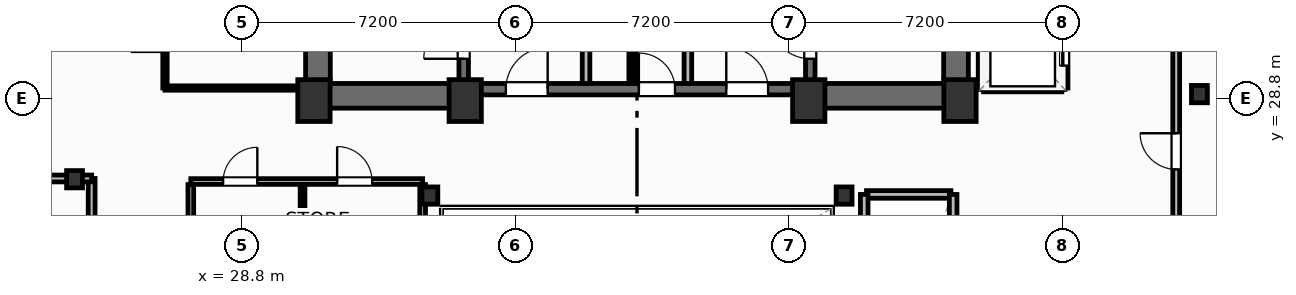
"""IFC4 building model, lengths in metres.
Left out: names, types, materials, properties, quantities, classifications, styles, units other than length and angle.
Written with IfcOpenShell. Run it as: python <this file> out.ifc"""

import sys

from ifc_helpers import new_model, si_unit, direction, frame, frame_2d, origin, origin_2d, place, context, subcontext, project, spatial, rectangle, i_section, extrude, element, fill, save


model = new_model("IFC4")
c1 = context("Model", 3, precision=1e-05, world=origin(), true_north=direction((0.0, 1.0)))
c2 = subcontext(c1, "Body", "Model", "MODEL_VIEW")
j1 = project(units=[si_unit("LENGTHUNIT", "METRE"), si_unit("PLANEANGLEUNIT", "RADIAN")], contexts=[c1])
p1 = place(None, origin())
s1 = spatial("IfcSite", under=j1, at=p1, CompositionType="ELEMENT")
p2 = place(p1, origin())
s2 = spatial("IfcBuilding", under=s1, at=p2, CompositionType="ELEMENT")
p3 = place(p2, frame((0.0, 0.0, 174.6)))
s3 = spatial("IfcBuildingStorey", under=s2, at=p3, CompositionType="ELEMENT", Elevation=174.6)
for number, where, z_axis, x_axis in (
    (1, (30.7, 28.75, 0.0), (0.0, 0.0, 1.0), (1.0, 0.0, 0.0)),
    (2, (34.68, 28.75, 0.0), (0.0, 0.0, 1.0), (1.0, 0.0, 0.0)),
    (3, (43.72, 28.75, 0.0), (0.0, 0.0, 1.0), (1.0, 0.0, 0.0)),
    (4, (47.7, 28.75, 0.0), (0.0, 0.0, 1.0), (1.0, 0.0, 0.0)),
):
    element("IfcColumn", number, at=place(p3, frame(where, z_axis=z_axis, x_axis=x_axis)), inside=s3, PredefinedType="COLUMN", context=c2, shape_type="SweptSolid", body=[
        extrude(rectangle(XDim=0.85, YDim=1.1, at=origin_2d()), origin(), (0.0, 0.0, 1.0), 3.7),
    ])
for number, where, z_axis, x_axis in (
    (5, (33.75, 26.25, 0.0), (0.0, 0.0, 1.0), (1.0, 0.0, 0.0)),
    (6, (44.65, 26.25, 0.0), (0.0, 0.0, 1.0), (1.0, 0.0, 0.0)),
    (7, (24.4, 26.68, 0.0), (0.0, 0.0, 1.0), (1.0, 0.0, 0.0)),
    (8, (54.0, 28.92, 0.0), (0.0, 0.0, 1.0), (1.0, 0.0, 0.0)),
):
    element("IfcColumn", number, at=place(p3, frame(where, z_axis=z_axis, x_axis=x_axis)), inside=s3, PredefinedType="COLUMN", context=c2, shape_type="SweptSolid", body=[
        extrude(i_section(OverallWidth=0.418, OverallDepth=0.455, WebThickness=0.042, FlangeThickness=0.068, FilletRadius=0.025, at=origin_2d()), origin(), (0.0, 0.0, 1.0), 3.7),
    ])
for number, where, z_axis, x_axis in (
    (9, (30.805, 29.2, 0.0), (0.0, 0.0, 1.0), (0.0, 1.0, 0.0)),
    (10, (47.595, 29.2, 0.0), (0.0, 0.0, 1.0), (0.0, 1.0, 0.0)),
):
    element("IfcWall", number, at=place(p3, frame(where, z_axis=z_axis, x_axis=x_axis)), inside=s3, PredefinedType="SHEAR", context=c2, shape_type="SweptSolid", body=[
        extrude(rectangle(XDim=9.22, YDim=0.65, at=frame_2d((4.61, 0.0))), origin(), (0.0, 0.0, 1.0), 3.45),
    ])
p4 = place(p3, frame((30.48, 28.875, 0.0), z_axis=(0.0, 0.0, 1.0), x_axis=(1.0, 0.0, 0.0)))
e11 = element("IfcWall", 11, at=p4, inside=s3, PredefinedType="SHEAR", context=c2, shape_type="SweptSolid", body=[
    extrude(rectangle(XDim=4.32, YDim=0.65, at=frame_2d((2.16, 0.0))), origin(), (0.0, 0.0, 1.0), 3.45),
])
p5 = place(p3, frame((43.6, 28.875, 0.0), z_axis=(0.0, 0.0, 1.0), x_axis=(1.0, 0.0, 0.0)))
e12 = element("IfcWall", 12, at=p5, inside=s3, PredefinedType="SHEAR", context=c2, shape_type="SweptSolid", body=[
    extrude(rectangle(XDim=4.32, YDim=0.65, at=frame_2d((2.16, 0.0))), origin(), (0.0, 0.0, 1.0), 3.45),
])
p6 = place(p3, frame((34.8, 29.05, 0.0), z_axis=(0.0, 0.0, 1.0), x_axis=(1.0, 0.0, 0.0)))
e13 = element("IfcWall", 13, at=p6, inside=s3, PredefinedType="SHEAR", context=c2, shape_type="SweptSolid", body=[
    extrude(rectangle(XDim=8.8, YDim=0.3, at=frame_2d((4.4, 0.0))), origin(), (0.0, 0.0, 1.0), 3.45),
])
p7 = place(p6, frame((0.95, 0.0, 0.0)))
e14 = element("IfcOpeningElement", 14, at=p7, cuts=e13, PredefinedType="OPENING", context=c2, shape_type="SweptSolid", body=[
    extrude(rectangle(XDim=1.1, YDim=2.15, at=frame_2d((0.55, 1.075))), frame((0.0, 0.16, 0.0), z_axis=(0.0, -1.0, 0.0), x_axis=(1.0, 0.0, 0.0)), (0.0, 0.0, 1.0), 0.32),
])
p8 = place(p6, frame((6.75, 0.0, 0.0)))
e15 = element("IfcOpeningElement", 15, at=p8, cuts=e13, PredefinedType="OPENING", context=c2, shape_type="SweptSolid", body=[
    extrude(rectangle(XDim=1.1, YDim=2.15, at=frame_2d((0.55, 1.075))), frame((0.0, 0.16, 0.0), z_axis=(0.0, -1.0, 0.0), x_axis=(1.0, 0.0, 0.0)), (0.0, 0.0, 1.0), 0.32),
])
p9 = place(p6, frame((4.45, 0.0, 0.0)))
e16 = element("IfcOpeningElement", 16, at=p9, cuts=e13, PredefinedType="OPENING", context=c2, shape_type="SweptSolid", body=[
    extrude(rectangle(XDim=0.95, YDim=2.15, at=frame_2d((0.475, 1.075))), frame((0.0, 0.16, 0.0), z_axis=(0.0, -1.0, 0.0), x_axis=(1.0, 0.0, 0.0)), (0.0, 0.0, 1.0), 0.32),
])
p10 = place(p3, frame((34.64, 29.2, 0.0), z_axis=(0.0, 0.0, 1.0), x_axis=(0.0, 1.0, 0.0)))
e17 = element("IfcWall", 17, at=p10, inside=s3, PredefinedType="SHEAR", context=c2, shape_type="SweptSolid", body=[
    extrude(rectangle(XDim=9.22, YDim=0.25, at=frame_2d((4.61, 0.0))), origin(), (0.0, 0.0, 1.0), 3.45),
])
p11 = place(p10, frame((0.65, 0.0, 0.0)))
e18 = element("IfcOpeningElement", 18, at=p11, cuts=e17, PredefinedType="OPENING", context=c2, shape_type="SweptSolid", body=[
    extrude(rectangle(XDim=1.05, YDim=2.15, at=frame_2d((0.525, 1.075))), frame((0.0, 0.135, 0.0), z_axis=(0.0, -1.0, 0.0), x_axis=(1.0, 0.0, 0.0)), (0.0, 0.0, 1.0), 0.27),
])
p12 = place(p3, frame((43.76, 29.2, 0.0), z_axis=(0.0, 0.0, 1.0), x_axis=(0.0, 1.0, 0.0)))
e19 = element("IfcWall", 19, at=p12, inside=s3, PredefinedType="SHEAR", context=c2, shape_type="SweptSolid", body=[
    extrude(rectangle(XDim=9.22, YDim=0.25, at=frame_2d((4.61, 0.0))), origin(), (0.0, 0.0, 1.0), 3.45),
])
p13 = place(p12, frame((0.65, 0.0, 0.0)))
e20 = element("IfcOpeningElement", 20, at=p13, cuts=e19, PredefinedType="OPENING", context=c2, shape_type="SweptSolid", body=[
    extrude(rectangle(XDim=1.05, YDim=2.15, at=frame_2d((0.525, 1.075))), frame((0.0, 0.135, 0.0), z_axis=(0.0, -1.0, 0.0), x_axis=(1.0, 0.0, 0.0)), (0.0, 0.0, 1.0), 0.27),
])
p14 = place(p3, frame((24.85, 19.2, 0.0), z_axis=(0.0, 0.0, 1.0), x_axis=(0.0, 1.0, 0.0)))
e21 = element("IfcWall", 21, at=p14, inside=s3, PredefinedType="PARTITIONING", context=c2, shape_type="SweptSolid", body=[
    extrude(rectangle(XDim=7.5, YDim=0.18, at=frame_2d((3.75, 0.0))), origin(), (0.0, 0.0, 1.0), 3.45),
])
p15 = place(p14, frame((3.275, 0.0, 0.0)))
e22 = element("IfcOpeningElement", 22, at=p15, cuts=e21, PredefinedType="OPENING", context=c2, shape_type="SweptSolid", body=[
    extrude(rectangle(XDim=0.95, YDim=2.05, at=frame_2d((0.475, 1.025))), frame((0.0, 0.1, 0.0), z_axis=(0.0, -1.0, 0.0), x_axis=(1.0, 0.0, 0.0)), (0.0, 0.0, 1.0), 0.2),
])
p16 = place(p3, frame((3.653, 26.7, 0.0), z_axis=(0.0, 0.0, 1.0), x_axis=(1.0, 0.0, 0.0)))
e23 = element("IfcWall", 23, at=p16, inside=s3, PredefinedType="PARTITIONING", context=c2, shape_type="SweptSolid", body=[
    extrude(rectangle(XDim=21.197, YDim=0.18, at=frame_2d((10.599, 0.0))), origin(), (0.0, 0.0, 1.0), 2.662),
])
p17 = place(p3, frame((53.39, 19.24, 0.0), z_axis=(0.0, 0.0, 1.0), x_axis=(0.0, 1.0, 0.0)))
e24 = element("IfcWall", 24, at=p17, inside=s3, PredefinedType="PARTITIONING", context=c2, shape_type="SweptSolid", body=[
    extrude(rectangle(XDim=20.06, YDim=0.18, at=frame_2d((10.03, 0.0))), origin(), (0.0, 0.0, 1.0), 3.45),
])
p18 = place(p17, frame((7.7, 0.0, 0.0)))
e25 = element("IfcOpeningElement", 25, at=p18, cuts=e24, PredefinedType="OPENING", context=c2, shape_type="SweptSolid", body=[
    extrude(rectangle(XDim=0.95, YDim=2.05, at=frame_2d((0.475, 1.025))), frame((0.0, 0.1, 0.0), z_axis=(0.0, -1.0, 0.0), x_axis=(1.0, 0.0, 0.0)), (0.0, 0.0, 1.0), 0.2),
])
for number, where, z_axis, x_axis in (
    (26, (37.86, 29.2, 0.0), (0.0, 0.0, 1.0), (0.0, 1.0, 0.0)),
    (27, (40.54, 29.2, 0.0), (0.0, 0.0, 1.0), (0.0, 1.0, 0.0)),
):
    element("IfcWall", number, at=place(p3, frame(where, z_axis=z_axis, x_axis=x_axis)), inside=s3, PredefinedType="PARTITIONING", context=c2, shape_type="SweptSolid", body=[
        extrude(rectangle(XDim=5.18, YDim=0.2, at=frame_2d((2.59, 0.0))), origin(), (0.0, 0.0, 1.0), 3.45),
    ])
p19 = place(p3, frame((39.05, 29.2, 0.0), z_axis=(0.0, 0.0, 1.0), x_axis=(0.0, 1.0, 0.0)))
e28 = element("IfcWall", 28, at=p19, inside=s3, PredefinedType="PARTITIONING", context=c2, shape_type="SweptSolid", body=[
    extrude(rectangle(XDim=5.22, YDim=0.125, at=frame_2d((2.61, 0.0))), origin(), (0.0, 0.0, 1.0), 3.45),
])
p20 = place(p19, frame((2.05, 0.0, 0.0)))
e29 = element("IfcOpeningElement", 29, at=p20, cuts=e28, PredefinedType="OPENING", context=c2, shape_type="SweptSolid", body=[
    extrude(rectangle(XDim=0.85, YDim=2.05, at=frame_2d((0.425, 1.025))), frame((0.0, 0.073, 0.0), z_axis=(0.0, -1.0, 0.0), x_axis=(1.0, 0.0, 0.0)), (0.0, 0.0, 1.0), 0.145),
])
p21 = place(p3, frame((27.46, 26.62, 0.0), z_axis=(0.0, 0.0, 1.0), x_axis=(1.0, 0.0, 0.0)))
e30 = element("IfcWall", 30, at=p21, inside=s3, PredefinedType="PARTITIONING", context=c2, shape_type="SweptSolid", body=[
    extrude(rectangle(XDim=6.1, YDim=0.15, at=frame_2d((3.05, 0.0))), origin(), (0.0, 0.0, 1.0), 2.662),
])
p22 = place(p21, frame((0.85, 0.0, 0.0)))
e31 = element("IfcOpeningElement", 31, at=p22, cuts=e30, PredefinedType="OPENING", context=c2, shape_type="SweptSolid", body=[
    extrude(rectangle(XDim=0.9, YDim=2.05, at=frame_2d((0.45, 1.025))), frame((0.0, 0.085, 0.0), z_axis=(0.0, -1.0, 0.0), x_axis=(1.0, 0.0, 0.0)), (0.0, 0.0, 1.0), 0.17),
])
p23 = place(p21, frame((3.85, 0.0, 0.0)))
e32 = element("IfcOpeningElement", 32, at=p23, cuts=e30, PredefinedType="OPENING", context=c2, shape_type="SweptSolid", body=[
    extrude(rectangle(XDim=0.92, YDim=2.05, at=frame_2d((0.46, 1.025))), frame((0.0, 0.085, 0.0), z_axis=(0.0, -1.0, 0.0), x_axis=(1.0, 0.0, 0.0)), (0.0, 0.0, 1.0), 0.17),
])
p24 = place(p3, frame((30.4, 23.0, 0.0), z_axis=(0.0, 0.0, 1.0), x_axis=(0.0, 1.0, 0.0)))
e33 = element("IfcWall", 33, at=p24, inside=s3, PredefinedType="PARTITIONING", context=c2, shape_type="SweptSolid", body=[
    extrude(rectangle(XDim=3.54, YDim=0.125, at=frame_2d((1.77, 0.0))), origin(), (0.0, 0.0, 1.0), 3.45),
])
p25 = place(p3, frame((27.46, 19.38, 0.0), z_axis=(0.0, 0.0, 1.0), x_axis=(0.0, 1.0, 0.0)))
e34 = element("IfcWall", 34, at=p25, inside=s3, PredefinedType="PARTITIONING", context=c2, shape_type="SweptSolid", body=[
    extrude(rectangle(XDim=7.16, YDim=0.15, at=frame_2d((3.58, 0.0))), origin(), (0.0, 0.0, 1.0), 3.45),
])
p26 = place(p25, frame((1.1, 0.0, 0.0)))
e35 = element("IfcOpeningElement", 35, at=p26, cuts=e34, PredefinedType="OPENING", context=c2, shape_type="SweptSolid", body=[
    extrude(rectangle(XDim=0.95, YDim=2.05, at=frame_2d((0.475, 1.025))), frame((0.0, 0.085, 0.0), z_axis=(0.0, -1.0, 0.0), x_axis=(1.0, 0.0, 0.0)), (0.0, 0.0, 1.0), 0.17),
])
p27 = place(p3, frame((33.56, 19.38, 0.0), z_axis=(0.0, 0.0, 1.0), x_axis=(0.0, 1.0, 0.0)))
e36 = element("IfcWall", 36, at=p27, inside=s3, PredefinedType="PARTITIONING", context=c2, shape_type="SweptSolid", body=[
    extrude(rectangle(XDim=7.16, YDim=0.15, at=frame_2d((3.58, 0.0))), origin(), (0.0, 0.0, 1.0), 2.824),
])
p28 = place(p3, frame((26.78, 29.08, 0.0), z_axis=(0.0, 0.0, 1.0), x_axis=(1.0, 0.0, 0.0)))
e37 = element("IfcWall", 37, at=p28, inside=s3, PredefinedType="PARTITIONING", context=c2, shape_type="SweptSolid", body=[
    extrude(rectangle(XDim=3.7, YDim=0.115, at=frame_2d((1.85, 0.0))), origin(), (0.0, 0.0, 1.0), 3.45),
])
p29 = place(p3, frame((26.78, 29.08, 0.0), z_axis=(0.0, 0.0, 1.0), x_axis=(0.0, 1.0, 0.0)))
e38 = element("IfcWall", 38, at=p29, inside=s3, PredefinedType="PARTITIONING", context=c2, shape_type="SweptSolid", body=[
    extrude(rectangle(XDim=3.11, YDim=0.115, at=frame_2d((1.555, 0.0))), origin(), (0.0, 0.0, 1.0), 3.45),
])
p30 = place(p29, frame((0.95, 0.0, 0.0)))
e39 = element("IfcOpeningElement", 39, at=p30, cuts=e38, PredefinedType="OPENING", context=c2, shape_type="SweptSolid", body=[
    extrude(rectangle(XDim=0.9, YDim=2.05, at=frame_2d((0.45, 1.025))), frame((0.0, 0.067, 0.0), z_axis=(0.0, -1.0, 0.0), x_axis=(1.0, 0.0, 0.0)), (0.0, 0.0, 1.0), 0.135),
])
p31 = place(p3, frame((48.32, 29.08, 0.0), z_axis=(0.0, 0.0, 1.0), x_axis=(1.0, 0.0, 0.0)))
e40 = element("IfcWall", 40, at=p31, inside=s3, PredefinedType="PARTITIONING", context=c2, shape_type="SweptSolid", body=[
    extrude(rectangle(XDim=2.06, YDim=0.2, at=frame_2d((1.03, 0.0))), origin(), (0.0, 0.0, 1.0), 2.662),
])
p32 = place(p3, frame((48.28, 29.08, 0.0), z_axis=(0.0, 0.0, 1.0), x_axis=(0.0, 1.0, 0.0)))
e41 = element("IfcWall", 41, at=p32, inside=s3, PredefinedType="PARTITIONING", context=c2, shape_type="SweptSolid", body=[
    extrude(rectangle(XDim=6.89, YDim=0.2, at=frame_2d((3.445, 0.0))), origin(), (0.0, 0.0, 1.0), 3.45),
])
p33 = place(p3, frame((50.44, 29.08, 0.0), z_axis=(0.0, 0.0, 1.0), x_axis=(0.0, 1.0, 0.0)))
e42 = element("IfcWall", 42, at=p33, inside=s3, PredefinedType="PARTITIONING", context=c2, shape_type="SweptSolid", body=[
    extrude(rectangle(XDim=6.89, YDim=0.2, at=frame_2d((3.445, 0.0))), origin(), (0.0, 0.0, 1.0), 3.45),
])
p34 = place(p33, frame((0.59, 0.0, 0.0)))
e43 = element("IfcOpeningElement", 43, at=p34, cuts=e42, PredefinedType="OPENING", context=c2, shape_type="SweptSolid", body=[
    extrude(rectangle(XDim=1.1, YDim=2.15, at=frame_2d((0.55, 1.075))), frame((0.0, 0.11, 0.0), z_axis=(0.0, -1.0, 0.0), x_axis=(1.0, 0.0, 0.0)), (0.0, 0.0, 1.0), 0.22),
])
p35 = place(p33, frame((2.89, 0.0, 0.0)))
e44 = element("IfcOpeningElement", 44, at=p35, cuts=e42, PredefinedType="OPENING", context=c2, shape_type="SweptSolid", body=[
    extrude(rectangle(XDim=1.1, YDim=2.15, at=frame_2d((0.55, 1.075))), frame((0.0, 0.11, 0.0), z_axis=(0.0, -1.0, 0.0), x_axis=(1.0, 0.0, 0.0)), (0.0, 0.0, 1.0), 0.22),
])
p36 = place(p33, frame((5.19, 0.0, 0.0)))
e45 = element("IfcOpeningElement", 45, at=p36, cuts=e42, PredefinedType="OPENING", context=c2, shape_type="SweptSolid", body=[
    extrude(rectangle(XDim=1.1, YDim=2.15, at=frame_2d((0.55, 1.075))), frame((0.0, 0.11, 0.0), z_axis=(0.0, -1.0, 0.0), x_axis=(1.0, 0.0, 0.0)), (0.0, 0.0, 1.0), 0.22),
])
p37 = place(p3, frame((45.24, 26.28, 0.0), z_axis=(0.0, 0.0, 1.0), x_axis=(1.0, 0.0, 0.0)))
e46 = element("IfcWall", 46, at=p37, inside=s3, PredefinedType="PARTITIONING", context=c2, shape_type="SweptSolid", body=[
    extrude(rectangle(XDim=2.22, YDim=0.2, at=frame_2d((1.11, 0.0))), origin(), (0.0, 0.0, 1.0), 3.45),
])
for number, where, z_axis, x_axis in (
    (47, (45.18, 19.38, 0.0), (0.0, 0.0, 1.0), (0.0, 1.0, 0.0)),
    (48, (47.52, 19.38, 0.0), (0.0, 0.0, 1.0), (0.0, 1.0, 0.0)),
):
    element("IfcWall", number, at=place(p3, frame(where, z_axis=z_axis, x_axis=x_axis)), inside=s3, PredefinedType="PARTITIONING", context=c2, shape_type="SweptSolid", body=[
        extrude(rectangle(XDim=6.9, YDim=0.2, at=frame_2d((3.45, 0.0))), origin(), (0.0, 0.0, 1.0), 3.45),
    ])
p38 = place(p18, origin())
e49 = element("IfcDoor", 49, at=p38, inside=s3, OperationType="SINGLE_SWING_RIGHT", PredefinedType="DOOR", context=c2, shape_type="SweptSolid", body=[
    extrude(rectangle(XDim=0.95, YDim=2.05, at=frame_2d((0.475, 1.025))), frame((0.0, 0.025, 0.0), z_axis=(0.0, -1.0, 0.0), x_axis=(1.0, 0.0, 0.0)), (0.0, 0.0, 1.0), 0.05),
])
fill(e25, e49)
p39 = place(p11, origin())
e50 = element("IfcDoor", 50, at=p39, inside=s3, OperationType="SINGLE_SWING_LEFT", PredefinedType="DOOR", context=c2, shape_type="SweptSolid", body=[
    extrude(rectangle(XDim=1.05, YDim=2.15, at=frame_2d((0.525, 1.075))), frame((0.0, 0.025, 0.0), z_axis=(0.0, -1.0, 0.0), x_axis=(1.0, 0.0, 0.0)), (0.0, 0.0, 1.0), 0.05),
])
fill(e18, e50)
p40 = place(p13, origin())
e51 = element("IfcDoor", 51, at=p40, inside=s3, OperationType="SINGLE_SWING_RIGHT", PredefinedType="DOOR", context=c2, shape_type="SweptSolid", body=[
    extrude(rectangle(XDim=1.05, YDim=2.15, at=frame_2d((0.525, 1.075))), frame((0.0, 0.025, 0.0), z_axis=(0.0, -1.0, 0.0), x_axis=(1.0, 0.0, 0.0)), (0.0, 0.0, 1.0), 0.05),
])
fill(e20, e51)
p41 = place(p7, origin())
e52 = element("IfcDoor", 52, at=p41, inside=s3, OperationType="SINGLE_SWING_RIGHT", PredefinedType="DOOR", context=c2, shape_type="SweptSolid", body=[
    extrude(rectangle(XDim=1.1, YDim=2.15, at=frame_2d((0.55, 1.075))), frame((0.0, 0.025, 0.0), z_axis=(0.0, -1.0, 0.0), x_axis=(1.0, 0.0, 0.0)), (0.0, 0.0, 1.0), 0.05),
])
fill(e14, e52)
p42 = place(p8, origin())
e53 = element("IfcDoor", 53, at=p42, inside=s3, OperationType="SINGLE_SWING_LEFT", PredefinedType="DOOR", context=c2, shape_type="SweptSolid", body=[
    extrude(rectangle(XDim=1.1, YDim=2.15, at=frame_2d((0.55, 1.075))), frame((0.0, 0.025, 0.0), z_axis=(0.0, -1.0, 0.0), x_axis=(1.0, 0.0, 0.0)), (0.0, 0.0, 1.0), 0.05),
])
fill(e15, e53)
p43 = place(p9, origin())
e54 = element("IfcDoor", 54, at=p43, inside=s3, OperationType="SINGLE_SWING_LEFT", PredefinedType="DOOR", context=c2, shape_type="SweptSolid", body=[
    extrude(rectangle(XDim=0.95, YDim=2.15, at=frame_2d((0.475, 1.075))), frame((0.0, 0.025, 0.0), z_axis=(0.0, -1.0, 0.0), x_axis=(1.0, 0.0, 0.0)), (0.0, 0.0, 1.0), 0.05),
])
fill(e16, e54)
p44 = place(p22, origin())
e55 = element("IfcDoor", 55, at=p44, inside=s3, OperationType="SINGLE_SWING_RIGHT", PredefinedType="DOOR", context=c2, shape_type="SweptSolid", body=[
    extrude(rectangle(XDim=0.9, YDim=2.05, at=frame_2d((0.45, 1.025))), frame((0.0, 0.025, 0.0), z_axis=(0.0, -1.0, 0.0), x_axis=(1.0, 0.0, 0.0)), (0.0, 0.0, 1.0), 0.05),
])
fill(e31, e55)
p45 = place(p23, origin())
e56 = element("IfcDoor", 56, at=p45, inside=s3, OperationType="SINGLE_SWING_LEFT", PredefinedType="DOOR", context=c2, shape_type="SweptSolid", body=[
    extrude(rectangle(XDim=0.92, YDim=2.05, at=frame_2d((0.46, 1.025))), frame((0.0, 0.025, 0.0), z_axis=(0.0, -1.0, 0.0), x_axis=(1.0, 0.0, 0.0)), (0.0, 0.0, 1.0), 0.05),
])
fill(e32, e56)
p46 = place(p34, origin())
e57 = element("IfcDoor", 57, at=p46, inside=s3, OperationType="SLIDING_TO_LEFT", PredefinedType="DOOR", context=c2, shape_type="SweptSolid", body=[
    extrude(rectangle(XDim=1.1, YDim=2.15, at=frame_2d((0.55, 1.075))), frame((0.0, 0.025, 0.0), z_axis=(0.0, -1.0, 0.0), x_axis=(1.0, 0.0, 0.0)), (0.0, 0.0, 1.0), 0.05),
])
fill(e43, e57)
save(model, sys.argv[1])
